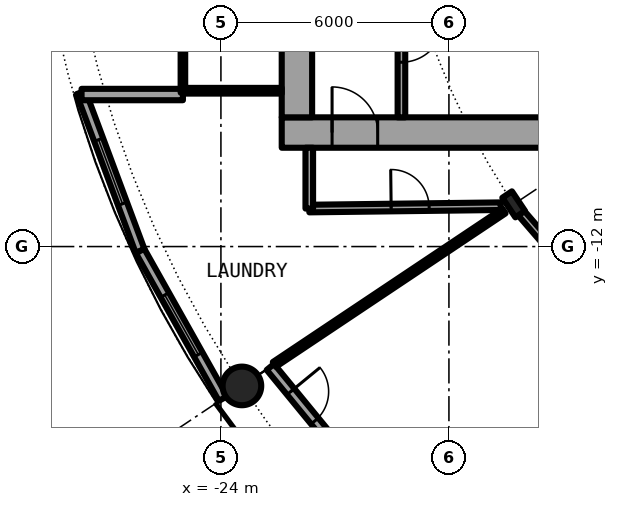
"""IFC4 building model, lengths in metres.
Left out: names, types, materials, properties, quantities, classifications, styles, units other than length and angle.
Written with IfcOpenShell. Run it as: python <this file> out.ifc"""

import sys

from ifc_helpers import new_model, si_unit, direction, frame, frame_2d, origin, origin_2d, place, context, subcontext, project, spatial, rectangle, hollow_circle, i_section, extrude, element, fill, save


model = new_model("IFC4")
c1 = context("Model", 3, precision=1e-05, world=origin(), true_north=direction((0.0, 1.0)))
c2 = subcontext(c1, "Body", "Model", "MODEL_VIEW")
j1 = project(units=[si_unit("LENGTHUNIT", "METRE"), si_unit("PLANEANGLEUNIT", "RADIAN")], contexts=[c1])
p1 = place(None, origin())
s1 = spatial("IfcSite", under=j1, at=p1, CompositionType="ELEMENT")
p2 = place(p1, origin())
s2 = spatial("IfcBuilding", under=s1, at=p2, CompositionType="ELEMENT")
p3 = place(p2, frame((0.0, 0.0, 53.3)))
s3 = spatial("IfcBuildingStorey", under=s2, at=p3, CompositionType="ELEMENT", Elevation=53.3)
p4 = place(p3, frame((-23.448, -15.667, 0.0), z_axis=(0.0, 0.0, 1.0), x_axis=(1.0, 0.0, 0.0)))
e1 = element("IfcColumn", 1, at=p4, inside=s3, PredefinedType="COLUMN", context=c2, shape_type="SweptSolid", body=[
    extrude(hollow_circle(Radius=0.508, WallThickness=0.05, at=origin_2d()), origin(), (0.0, 0.0, 1.0), 4.2),
])
p5 = place(p3, frame((-16.297, -10.889, 0.0), z_axis=(0.0, 0.0, 1.0), x_axis=(-0.831469612303, -0.55557023302, 0.0)))
e2 = element("IfcColumn", 2, at=p5, inside=s3, PredefinedType="COLUMN", context=c2, shape_type="SweptSolid", body=[
    extrude(i_section(OverallWidth=0.305, OverallDepth=0.62, WebThickness=0.021, FlangeThickness=0.04, FilletRadius=0.027, at=origin_2d()), origin(), (0.0, 0.0, 1.0), 4.2),
])
p6 = place(p3, frame((-22.699, -15.167, 0.0), z_axis=(0.0, 0.0, 1.0), x_axis=(0.634382322723, -0.773019449054, 0.0)))
e3 = element("IfcWall", 3, at=p6, inside=s3, PredefinedType="SOLIDWALL", context=c2, shape_type="SweptSolid", body=[
    extrude(rectangle(XDim=5.352, YDim=0.25, at=frame_2d((2.676, 0.0))), origin(), (0.0, 0.0, 1.0), 3.8),
])
p7 = place(p6, frame((0.841, 0.0, 0.0)))
e4 = element("IfcOpeningElement", 4, at=p7, cuts=e3, PredefinedType="OPENING", context=c2, shape_type="SweptSolid", body=[
    extrude(rectangle(XDim=1.0, YDim=2.2, at=frame_2d((0.5, 1.1))), frame((0.0, 0.135, 0.0), z_axis=(0.0, -1.0, 0.0), x_axis=(1.0, 0.0, 0.0)), (0.0, 0.0, 1.0), 0.27),
])
p8 = place(p6, frame((3.51, 0.0, 0.0)))
e5 = element("IfcOpeningElement", 5, at=p8, cuts=e3, PredefinedType="OPENING", context=c2, shape_type="SweptSolid", body=[
    extrude(rectangle(XDim=1.0, YDim=2.2, at=frame_2d((0.5, 1.1))), frame((0.0, 0.135, 0.0), z_axis=(0.0, -1.0, 0.0), x_axis=(1.0, 0.0, 0.0)), (0.0, 0.0, 1.0), 0.27),
])
p9 = place(p3, frame((-27.682, -7.945, 0.0), z_axis=(0.0, 0.0, 1.0), x_axis=(0.349247811493, -0.937030397675, 0.0)))
e6 = element("IfcWall", 6, at=p9, inside=s3, PredefinedType="SOLIDWALL", context=c2, shape_type="SweptSolid", body=[
    extrude(rectangle(XDim=4.452, YDim=0.25, at=frame_2d((2.226, 0.0))), origin(), (0.0, 0.0, 1.0), 3.8),
])
p10 = place(p9, frame((1.327, 0.0, 0.3)))
e7 = element("IfcOpeningElement", 7, at=p10, cuts=e6, PredefinedType="OPENING", context=c2, shape_type="SweptSolid", body=[
    extrude(rectangle(XDim=1.8, YDim=2.1, at=frame_2d((0.9, 1.05))), frame((0.0, 0.135, 0.0), z_axis=(0.0, -1.0, 0.0), x_axis=(1.0, 0.0, 0.0)), (0.0, 0.0, 1.0), 0.27),
])
p11 = place(p3, frame((-26.127, -12.117, 0.0), z_axis=(0.0, 0.0, 1.0), x_axis=(0.489696356642, -0.871893042919, 0.0)))
e8 = element("IfcWall", 8, at=p11, inside=s3, PredefinedType="SOLIDWALL", context=c2, shape_type="SweptSolid", body=[
    extrude(rectangle(XDim=4.454, YDim=0.25, at=frame_2d((2.227, 0.0))), origin(), (0.0, 0.0, 1.0), 3.8),
])
p12 = place(p11, frame((1.327, 0.0, 0.3)))
e9 = element("IfcOpeningElement", 9, at=p12, cuts=e8, PredefinedType="OPENING", context=c2, shape_type="SweptSolid", body=[
    extrude(rectangle(XDim=1.8, YDim=2.1, at=frame_2d((0.9, 1.05))), frame((0.0, 0.135, 0.0), z_axis=(0.0, -1.0, 0.0), x_axis=(1.0, 0.0, 0.0)), (0.0, 0.0, 1.0), 0.27),
])
p13 = place(p3, frame((-25.0, -8.0, 0.0), z_axis=(0.0, 0.0, 1.0), x_axis=(-1.0, 0.0, 0.0)))
e10 = element("IfcWall", 10, at=p13, inside=s3, PredefinedType="SOLIDWALL", context=c2, shape_type="SweptSolid", body=[
    extrude(rectangle(XDim=2.667, YDim=0.3, at=frame_2d((1.333, 0.0))), origin(), (0.0, 0.0, 1.0), 3.8),
])
p14 = place(p3, frame((-22.4, -9.0, 0.0), z_axis=(0.0, 0.0, 1.0), x_axis=(1.0, 0.0, 0.0)))
e11 = element("IfcWall", 11, at=p14, inside=s3, PredefinedType="SHEAR", context=c2, shape_type="SweptSolid", body=[
    extrude(rectangle(XDim=14.2, YDim=0.8, at=frame_2d((7.1, 0.0))), origin(), (0.0, 0.0, 1.0), 4.2),
])
p15 = place(p14, frame((1.325, 0.0, 0.0)))
e12 = element("IfcOpeningElement", 12, at=p15, cuts=e11, PredefinedType="OPENING", context=c2, shape_type="SweptSolid", body=[
    extrude(rectangle(XDim=1.2, YDim=2.3, at=frame_2d((0.6, 1.15))), frame((0.0, 0.41, 0.0), z_axis=(0.0, -1.0, 0.0), x_axis=(1.0, 0.0, 0.0)), (0.0, 0.0, 1.0), 0.82),
])
p16 = place(p3, frame((-22.0, -8.6, 0.0), z_axis=(0.0, 0.0, 1.0), x_axis=(0.0, 1.0, 0.0)))
e13 = element("IfcWall", 13, at=p16, inside=s3, PredefinedType="SHEAR", context=c2, shape_type="SweptSolid", body=[
    extrude(rectangle(XDim=17.2, YDim=0.8, at=frame_2d((8.6, 0.0))), origin(), (0.0, 0.0, 1.0), 4.2),
])
p17 = place(p16, frame((7.7, 0.0, 0.0)))
e14 = element("IfcOpeningElement", 14, at=p17, cuts=e13, PredefinedType="OPENING", context=c2, shape_type="SweptSolid", body=[
    extrude(rectangle(XDim=1.8, YDim=2.3, at=frame_2d((0.9, 1.15))), frame((0.0, 0.41, 0.0), z_axis=(0.0, -1.0, 0.0), x_axis=(1.0, 0.0, 0.0)), (0.0, 0.0, 1.0), 0.82),
])
p18 = place(p3, frame((-19.25, -1.575, 0.0), z_axis=(0.0, 0.0, 1.0), x_axis=(0.0, -1.0, 0.0)))
e15 = element("IfcWall", 15, at=p18, inside=s3, PredefinedType="SOLIDWALL", context=c2, shape_type="SweptSolid", body=[
    extrude(rectangle(XDim=7.025, YDim=0.2, at=frame_2d((3.513, 0.0))), origin(), (0.0, 0.0, 1.0), 3.8),
])
p19 = place(p18, frame((4.475, 0.0, 0.0)))
e16 = element("IfcOpeningElement", 16, at=p19, cuts=e15, PredefinedType="OPENING", context=c2, shape_type="SweptSolid", body=[
    extrude(rectangle(XDim=1.1, YDim=2.3, at=frame_2d((0.55, 1.15))), frame((0.0, 0.11, 0.0), z_axis=(0.0, -1.0, 0.0), x_axis=(1.0, 0.0, 0.0)), (0.0, 0.0, 1.0), 0.22),
])
p20 = place(p3, frame((-22.4, -7.9, 0.0), z_axis=(0.0, 0.0, 1.0), x_axis=(-1.0, 0.0, 0.0)))
e17 = element("IfcWall", 17, at=p20, inside=s3, PredefinedType="PARTITIONING", context=c2, shape_type="SweptSolid", body=[
    extrude(rectangle(XDim=2.54, YDim=0.15, at=frame_2d((1.27, 0.0))), origin(), (0.0, 0.0, 1.0), 3.8),
])
p21 = place(p3, frame((-25.0, 7.95, 0.0), z_axis=(0.0, 0.0, 1.0), x_axis=(0.0, -1.0, 0.0)))
e18 = element("IfcWall", 18, at=p21, inside=s3, PredefinedType="PARTITIONING", context=c2, shape_type="SweptSolid", body=[
    extrude(rectangle(XDim=15.9, YDim=0.12, at=frame_2d((7.95, 0.0))), origin(), (0.0, 0.0, 1.0), 3.8),
])
p22 = place(p21, frame((0.95, 0.0, 0.1)))
e19 = element("IfcOpeningElement", 19, at=p22, cuts=e18, PredefinedType="OPENING", context=c2, shape_type="SweptSolid", body=[
    extrude(rectangle(XDim=14.0, YDim=3.0, at=frame_2d((7.0, 1.5))), frame((0.0, 0.07, 0.0), z_axis=(0.0, -1.0, 0.0), x_axis=(1.0, 0.0, 0.0)), (0.0, 0.0, 1.0), 0.14),
])
p23 = place(p3, frame((-16.196, -11.006, 0.0), z_axis=(0.0, 0.0, 1.0), x_axis=(0.653087281304, -0.757282644063, 0.0)))
e20 = element("IfcWall", 20, at=p23, inside=s3, PredefinedType="PARTITIONING", context=c2, shape_type="SweptSolid", body=[
    extrude(rectangle(XDim=4.644, YDim=0.2, at=frame_2d((2.322, 0.0))), origin(), (0.0, 0.0, 1.0), 3.48),
])
p24 = place(p3, frame((-21.675, -11.0, 0.0), z_axis=(0.0, 0.0, 1.0), x_axis=(0.99992425795, 0.012307654658, 0.0)))
e21 = element("IfcWall", 21, at=p24, inside=s3, PredefinedType="PARTITIONING", context=c2, shape_type="SweptSolid", body=[
    extrude(rectangle(XDim=5.039, YDim=0.2, at=frame_2d((2.519, 0.0))), origin(), (0.0, 0.0, 1.0), 3.8),
])
p25 = place(p24, frame((2.155, 0.0, 0.0)))
e22 = element("IfcOpeningElement", 22, at=p25, cuts=e21, PredefinedType="OPENING", context=c2, shape_type="SweptSolid", body=[
    extrude(rectangle(XDim=1.0, YDim=2.3, at=frame_2d((0.5, 1.15))), frame((0.0, 0.11, 0.0), z_axis=(0.0, -1.0, 0.0), x_axis=(1.0, 0.0, 0.0)), (0.0, 0.0, 1.0), 0.22),
])
p26 = place(p3, frame((-22.593, -15.101, 0.0), z_axis=(0.0, 0.0, 1.0), x_axis=(0.831491533374, 0.555537424416, 0.0)))
e23 = element("IfcWall", 23, at=p26, inside=s3, PredefinedType="PARTITIONING", context=c2, shape_type="SweptSolid", body=[
    extrude(rectangle(XDim=7.265, YDim=0.15, at=frame_2d((3.633, 0.0))), origin(), (0.0, 0.0, 1.0), 3.8),
])
p27 = place(p3, frame((-21.675, -11.0, 0.0), z_axis=(0.0, 0.0, 1.0), x_axis=(0.0, 1.0, 0.0)))
e24 = element("IfcWall", 24, at=p27, inside=s3, PredefinedType="PARTITIONING", context=c2, shape_type="SweptSolid", body=[
    extrude(rectangle(XDim=1.6, YDim=0.2, at=frame_2d((0.8, 0.0))), origin(), (0.0, 0.0, 1.0), 3.8),
])
p28 = place(p7, origin())
e25 = element("IfcDoor", 25, at=p28, inside=s3, OperationType="SINGLE_SWING_LEFT", PredefinedType="DOOR", context=c2, shape_type="SweptSolid", body=[
    extrude(rectangle(XDim=1.0, YDim=2.2, at=frame_2d((0.5, 1.1))), frame((0.0, 0.025, 0.0), z_axis=(0.0, -1.0, 0.0), x_axis=(1.0, 0.0, 0.0)), (0.0, 0.0, 1.0), 0.05),
])
fill(e4, e25)
p29 = place(p10, origin())
e26 = element("IfcWindow", 26, at=p29, inside=s3, PartitioningType="SINGLE_PANEL", PredefinedType="WINDOW", context=c2, shape_type="SweptSolid", body=[
    extrude(rectangle(XDim=1.8, YDim=2.1, at=frame_2d((0.9, 1.05))), frame((0.0, 0.03, 0.0), z_axis=(0.0, -1.0, 0.0), x_axis=(1.0, 0.0, 0.0)), (0.0, 0.0, 1.0), 0.06),
])
fill(e7, e26)
p30 = place(p12, origin())
e27 = element("IfcWindow", 27, at=p30, inside=s3, PartitioningType="SINGLE_PANEL", PredefinedType="WINDOW", context=c2, shape_type="SweptSolid", body=[
    extrude(rectangle(XDim=1.8, YDim=2.1, at=frame_2d((0.9, 1.05))), frame((0.0, 0.03, 0.0), z_axis=(0.0, -1.0, 0.0), x_axis=(1.0, 0.0, 0.0)), (0.0, 0.0, 1.0), 0.06),
])
fill(e9, e27)
p31 = place(p19, origin())
e28 = element("IfcDoor", 28, at=p31, inside=s3, OperationType="SINGLE_SWING_LEFT", PredefinedType="DOOR", context=c2, shape_type="SweptSolid", body=[
    extrude(rectangle(XDim=1.1, YDim=2.3, at=frame_2d((0.55, 1.15))), frame((0.0, 0.025, 0.0), z_axis=(0.0, -1.0, 0.0), x_axis=(1.0, 0.0, 0.0)), (0.0, 0.0, 1.0), 0.05),
])
fill(e16, e28)
p32 = place(p15, origin())
e29 = element("IfcDoor", 29, at=p32, inside=s3, OperationType="SINGLE_SWING_RIGHT", PredefinedType="DOOR", context=c2, shape_type="SweptSolid", body=[
    extrude(rectangle(XDim=1.2, YDim=2.3, at=frame_2d((0.6, 1.15))), frame((0.0, 0.025, 0.0), z_axis=(0.0, -1.0, 0.0), x_axis=(1.0, 0.0, 0.0)), (0.0, 0.0, 1.0), 0.05),
])
fill(e12, e29)
p33 = place(p22, origin())
e30 = element("IfcWindow", 30, at=p33, inside=s3, PartitioningType="SINGLE_PANEL", PredefinedType="WINDOW", context=c2, shape_type="SweptSolid", body=[
    extrude(rectangle(XDim=14.0, YDim=3.0, at=frame_2d((7.0, 1.5))), frame((0.0, 0.03, 0.0), z_axis=(0.0, -1.0, 0.0), x_axis=(1.0, 0.0, 0.0)), (0.0, 0.0, 1.0), 0.06),
])
fill(e19, e30)
p34 = place(p25, origin())
e31 = element("IfcDoor", 31, at=p34, inside=s3, OperationType="SINGLE_SWING_RIGHT", PredefinedType="DOOR", context=c2, shape_type="SweptSolid", body=[
    extrude(rectangle(XDim=1.0, YDim=2.3, at=frame_2d((0.5, 1.15))), frame((0.0, 0.025, 0.0), z_axis=(0.0, -1.0, 0.0), x_axis=(1.0, 0.0, 0.0)), (0.0, 0.0, 1.0), 0.05),
])
fill(e22, e31)
save(model, sys.argv[1])
